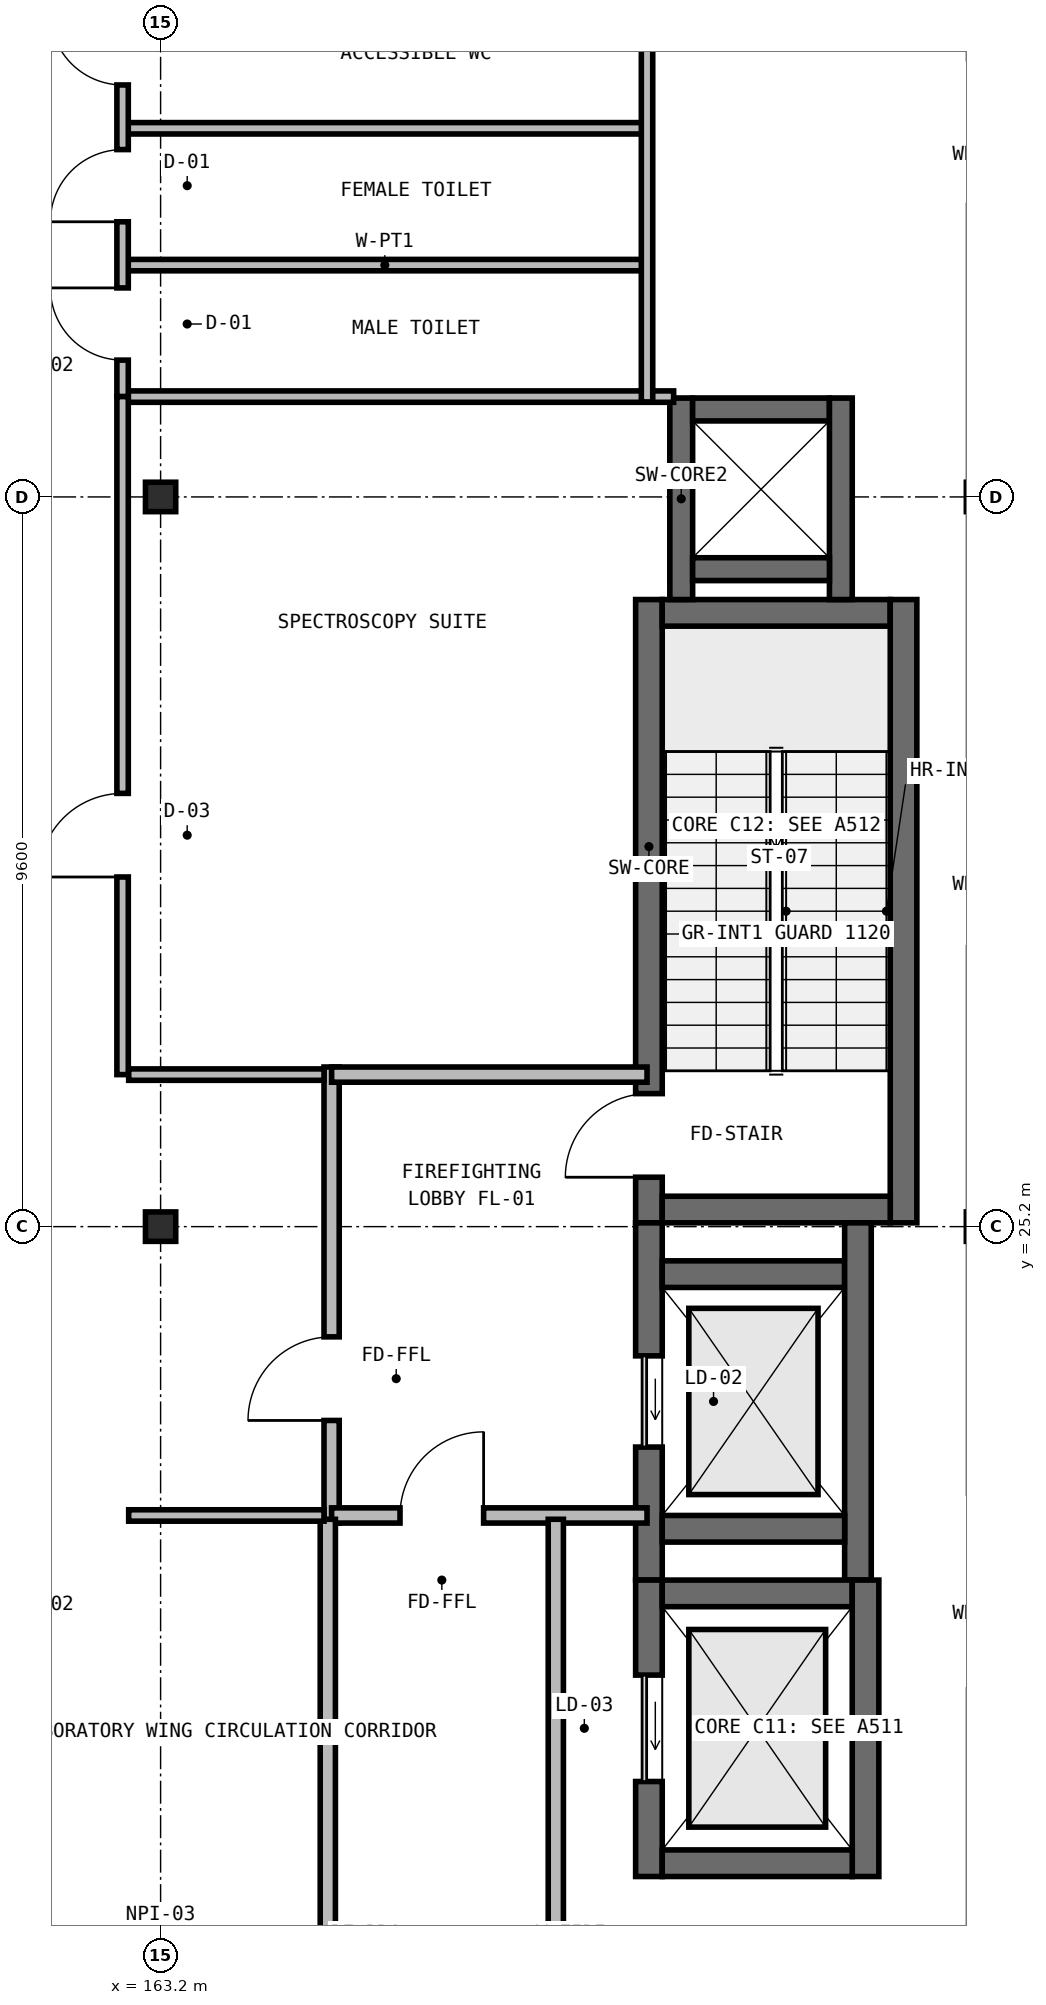
"""IFC4 building model, lengths in metres.
Left out: names, types, materials, properties, quantities, classifications, styles, units other than length and angle.
Written with IfcOpenShell. Run it as: python <this file> out.ifc"""

import sys

from ifc_helpers import new_model, si_unit, direction, frame, frame_2d, origin, origin_2d, place, context, subcontext, project, spatial, rectangle, i_section, extrude, element, fill, save


model = new_model("IFC4")
c1 = context("Model", 3, precision=1e-05, world=origin(), true_north=direction((0.0, 1.0)))
c2 = subcontext(c1, "Body", "Model", "MODEL_VIEW")
j1 = project(units=[si_unit("LENGTHUNIT", "METRE"), si_unit("PLANEANGLEUNIT", "RADIAN")], contexts=[c1])
p1 = place(None, origin())
s1 = spatial("IfcSite", under=j1, at=p1, CompositionType="ELEMENT")
p2 = place(p1, origin())
s2 = spatial("IfcBuilding", under=s1, at=p2, CompositionType="ELEMENT")
p3 = place(p2, origin())
s3 = spatial("IfcBuildingStorey", under=s2, at=p3, CompositionType="ELEMENT", Elevation=0.0)
p4 = place(p3, frame((169.625, 25.25, 0.0), z_axis=(0.0, 0.0, 1.0), x_axis=(0.0, 1.0, 0.0)))
e1 = element("IfcWall", 1, at=p4, inside=s3, PredefinedType="SHEAR", context=c2, shape_type="SweptSolid", body=[
    extrude(rectangle(XDim=8.2, YDim=0.35, at=frame_2d((4.1, 0.0))), origin(), (0.0, 0.0, 1.0), 5.25),
])
p5 = place(p4, frame((0.6, 0.0, 0.0)))
e2 = element("IfcOpeningElement", 2, at=p5, cuts=e1, PredefinedType="OPENING", context=c2, shape_type="SweptSolid", body=[
    extrude(rectangle(XDim=1.1, YDim=2.15, at=frame_2d((0.55, 1.075))), frame((0.0, 0.185, 0.0), z_axis=(0.0, -1.0, 0.0), x_axis=(1.0, 0.0, 0.0)), (0.0, 0.0, 1.0), 0.37),
])
p6 = place(p3, frame((169.8, 33.275, 0.0), z_axis=(0.0, 0.0, 1.0), x_axis=(1.0, 0.0, 0.0)))
e3 = element("IfcWall", 3, at=p6, inside=s3, PredefinedType="SHEAR", context=c2, shape_type="SweptSolid", body=[
    extrude(rectangle(XDim=3.0, YDim=0.35, at=frame_2d((1.5, 0.0))), origin(), (0.0, 0.0, 1.0), 5.25),
])
p7 = place(p3, frame((172.975, 33.45, 0.0), z_axis=(0.0, 0.0, 1.0), x_axis=(0.0, -1.0, 0.0)))
e4 = element("IfcWall", 4, at=p7, inside=s3, PredefinedType="SHEAR", context=c2, shape_type="SweptSolid", body=[
    extrude(rectangle(XDim=8.2, YDim=0.35, at=frame_2d((4.1, 0.0))), origin(), (0.0, 0.0, 1.0), 5.25),
])
p8 = place(p3, frame((172.8, 25.425, 0.0), z_axis=(0.0, 0.0, 1.0), x_axis=(-1.0, 0.0, 0.0)))
e5 = element("IfcWall", 5, at=p8, inside=s3, PredefinedType="SHEAR", context=c2, shape_type="SweptSolid", body=[
    extrude(rectangle(XDim=3.0, YDim=0.35, at=frame_2d((1.5, 0.0))), origin(), (0.0, 0.0, 1.0), 5.25),
])
p9 = place(p3, frame((169.625, 20.55, 0.0), z_axis=(0.0, 0.0, 1.0), x_axis=(0.0, 1.0, 0.0)))
e6 = element("IfcWall", 6, at=p9, inside=s3, PredefinedType="SHEAR", context=c2, shape_type="SweptSolid", body=[
    extrude(rectangle(XDim=4.7, YDim=0.35, at=frame_2d((2.35, 0.0))), origin(), (0.0, 0.0, 1.0), 5.25),
])
p10 = place(p9, frame((1.75, 0.0, 0.0)))
e7 = element("IfcOpeningElement", 7, at=p10, cuts=e6, PredefinedType="OPENING", context=c2, shape_type="SweptSolid", body=[
    extrude(rectangle(XDim=1.2, YDim=2.15, at=frame_2d((0.6, 1.075))), frame((0.0, 0.185, 0.0), z_axis=(0.0, -1.0, 0.0), x_axis=(1.0, 0.0, 0.0)), (0.0, 0.0, 1.0), 0.37),
])
p11 = place(p3, frame((169.8, 24.575, 0.0), z_axis=(0.0, 0.0, 1.0), x_axis=(1.0, 0.0, 0.0)))
e8 = element("IfcWall", 8, at=p11, inside=s3, PredefinedType="SHEAR", context=c2, shape_type="SweptSolid", body=[
    extrude(rectangle(XDim=2.4, YDim=0.35, at=frame_2d((1.2, 0.0))), origin(), (0.0, 0.0, 1.0), 5.25),
])
p12 = place(p3, frame((172.375, 25.25, 0.0), z_axis=(0.0, 0.0, 1.0), x_axis=(0.0, -1.0, 0.0)))
e9 = element("IfcWall", 9, at=p12, inside=s3, PredefinedType="SHEAR", context=c2, shape_type="SweptSolid", body=[
    extrude(rectangle(XDim=4.7, YDim=0.35, at=frame_2d((2.35, 0.0))), origin(), (0.0, 0.0, 1.0), 5.25),
])
p13 = place(p3, frame((172.2, 21.225, 0.0), z_axis=(0.0, 0.0, 1.0), x_axis=(-1.0, 0.0, 0.0)))
e10 = element("IfcWall", 10, at=p13, inside=s3, PredefinedType="SHEAR", context=c2, shape_type="SweptSolid", body=[
    extrude(rectangle(XDim=2.4, YDim=0.35, at=frame_2d((1.2, 0.0))), origin(), (0.0, 0.0, 1.0), 5.25),
])
p14 = place(p3, frame((169.625, 16.65, 0.0), z_axis=(0.0, 0.0, 1.0), x_axis=(0.0, 1.0, 0.0)))
e11 = element("IfcWall", 11, at=p14, inside=s3, PredefinedType="SHEAR", context=c2, shape_type="SweptSolid", body=[
    extrude(rectangle(XDim=3.9, YDim=0.35, at=frame_2d((1.95, 0.0))), origin(), (0.0, 0.0, 1.0), 5.25),
])
p15 = place(p14, frame((1.25, 0.0, 0.0)))
e12 = element("IfcOpeningElement", 12, at=p15, cuts=e11, PredefinedType="OPENING", context=c2, shape_type="SweptSolid", body=[
    extrude(rectangle(XDim=1.4, YDim=2.3, at=frame_2d((0.7, 1.15))), frame((0.0, 0.185, 0.0), z_axis=(0.0, -1.0, 0.0), x_axis=(1.0, 0.0, 0.0)), (0.0, 0.0, 1.0), 0.37),
])
p16 = place(p3, frame((169.8, 20.375, 0.0), z_axis=(0.0, 0.0, 1.0), x_axis=(1.0, 0.0, 0.0)))
e13 = element("IfcWall", 13, at=p16, inside=s3, PredefinedType="SHEAR", context=c2, shape_type="SweptSolid", body=[
    extrude(rectangle(XDim=2.5, YDim=0.35, at=frame_2d((1.25, 0.0))), origin(), (0.0, 0.0, 1.0), 5.25),
])
p17 = place(p3, frame((172.475, 20.55, 0.0), z_axis=(0.0, 0.0, 1.0), x_axis=(0.0, -1.0, 0.0)))
e14 = element("IfcWall", 14, at=p17, inside=s3, PredefinedType="SHEAR", context=c2, shape_type="SweptSolid", body=[
    extrude(rectangle(XDim=3.9, YDim=0.35, at=frame_2d((1.95, 0.0))), origin(), (0.0, 0.0, 1.0), 5.25),
])
p18 = place(p3, frame((172.3, 16.825, 0.0), z_axis=(0.0, 0.0, 1.0), x_axis=(-1.0, 0.0, 0.0)))
e15 = element("IfcWall", 15, at=p18, inside=s3, PredefinedType="SHEAR", context=c2, shape_type="SweptSolid", body=[
    extrude(rectangle(XDim=2.5, YDim=0.35, at=frame_2d((1.25, 0.0))), origin(), (0.0, 0.0, 1.0), 5.25),
])
for number, where, z_axis, x_axis in (
    (16, (163.2, 25.2, 0.0), (0.0, 0.0, 1.0), (1.0, 0.0, 0.0)),
    (17, (163.2, 34.8, 0.0), (0.0, 0.0, 1.0), (1.0, 0.0, 0.0)),
):
    element("IfcColumn", number, at=place(p3, frame(where, z_axis=z_axis, x_axis=x_axis)), inside=s3, PredefinedType="COLUMN", context=c2, shape_type="SweptSolid", body=[
        extrude(i_section(OverallWidth=0.398, OverallDepth=0.387, WebThickness=0.024, FlangeThickness=0.039, at=origin_2d()), origin(), (0.0, 0.0, 1.0), 5.25),
    ])
p19 = place(p3, frame((170.05, 33.45, 0.0), z_axis=(0.0, 0.0, 1.0), x_axis=(0.0, 1.0, 0.0)))
e18 = element("IfcWall", 18, at=p19, inside=s3, PredefinedType="SHEAR", context=c2, shape_type="SweptSolid", body=[
    extrude(rectangle(XDim=2.65, YDim=0.3, at=frame_2d((1.325, 0.0))), origin(), (0.0, 0.0, 1.0), 5.07),
])
p20 = place(p3, frame((170.2, 35.95, 0.0), z_axis=(0.0, 0.0, 1.0), x_axis=(1.0, 0.0, 0.0)))
e19 = element("IfcWall", 19, at=p20, inside=s3, PredefinedType="SHEAR", context=c2, shape_type="SweptSolid", body=[
    extrude(rectangle(XDim=1.8, YDim=0.3, at=frame_2d((0.9, 0.0))), origin(), (0.0, 0.0, 1.0), 5.07),
])
p21 = place(p3, frame((172.15, 36.1, 0.0), z_axis=(0.0, 0.0, 1.0), x_axis=(0.0, -1.0, 0.0)))
e20 = element("IfcWall", 20, at=p21, inside=s3, PredefinedType="SHEAR", context=c2, shape_type="SweptSolid", body=[
    extrude(rectangle(XDim=2.65, YDim=0.3, at=frame_2d((1.325, 0.0))), origin(), (0.0, 0.0, 1.0), 5.07),
])
p22 = place(p3, frame((172.0, 33.85, 0.0), z_axis=(0.0, 0.0, 1.0), x_axis=(-1.0, 0.0, 0.0)))
e21 = element("IfcWall", 21, at=p22, inside=s3, PredefinedType="SHEAR", context=c2, shape_type="SweptSolid", body=[
    extrude(rectangle(XDim=1.8, YDim=0.3, at=frame_2d((0.9, 0.0))), origin(), (0.0, 0.0, 1.0), 5.07),
])
p23 = place(p3, frame((165.45, 21.3, 0.0), z_axis=(0.0, 0.0, 1.0), x_axis=(0.0, 1.0, 0.0)))
e22 = element("IfcWall", 22, at=p23, inside=s3, PredefinedType="SOLIDWALL", context=c2, shape_type="SweptSolid", body=[
    extrude(rectangle(XDim=6.0, YDim=0.2, at=frame_2d((3.0, 0.0))), origin(), (0.0, 0.0, 1.0), 4.93),
])
p24 = place(p23, frame((1.35, 0.0, 0.0)))
e23 = element("IfcOpeningElement", 23, at=p24, cuts=e22, PredefinedType="OPENING", context=c2, shape_type="SweptSolid", body=[
    extrude(rectangle(XDim=1.1, YDim=2.15, at=frame_2d((0.55, 1.075))), frame((0.0, 0.11, 0.0), z_axis=(0.0, -1.0, 0.0), x_axis=(1.0, 0.0, 0.0)), (0.0, 0.0, 1.0), 0.22),
])
p25 = place(p3, frame((165.45, 21.4, 0.0), z_axis=(0.0, 0.0, 1.0), x_axis=(1.0, 0.0, 0.0)))
e24 = element("IfcWall", 24, at=p25, inside=s3, PredefinedType="SOLIDWALL", context=c2, shape_type="SweptSolid", body=[
    extrude(rectangle(XDim=4.15, YDim=0.2, at=frame_2d((2.075, 0.0))), origin(), (0.0, 0.0, 1.0), 4.93),
])
p26 = place(p25, frame((0.9, 0.0, 0.0)))
e25 = element("IfcOpeningElement", 25, at=p26, cuts=e24, PredefinedType="OPENING", context=c2, shape_type="SweptSolid", body=[
    extrude(rectangle(XDim=1.1, YDim=2.15, at=frame_2d((0.55, 1.075))), frame((0.0, 0.11, 0.0), z_axis=(0.0, -1.0, 0.0), x_axis=(1.0, 0.0, 0.0)), (0.0, 0.0, 1.0), 0.22),
])
p27 = place(p3, frame((165.45, 27.2, 0.0), z_axis=(0.0, 0.0, 1.0), x_axis=(1.0, 0.0, 0.0)))
e26 = element("IfcWall", 26, at=p27, inside=s3, PredefinedType="SOLIDWALL", context=c2, shape_type="SweptSolid", body=[
    extrude(rectangle(XDim=4.15, YDim=0.2, at=frame_2d((2.075, 0.0))), origin(), (0.0, 0.0, 1.0), 4.93),
])
p28 = place(p3, frame((165.4, 11.15, 0.0), z_axis=(0.0, 0.0, 1.0), x_axis=(0.0, 1.0, 0.0)))
e27 = element("IfcWall", 27, at=p28, inside=s3, PredefinedType="SOLIDWALL", context=c2, shape_type="SweptSolid", body=[
    extrude(rectangle(XDim=10.2, YDim=0.2, at=frame_2d((5.1, 0.0))), origin(), (0.0, 0.0, 1.0), 4.93),
])
p29 = place(p3, frame((168.4, 14.95, 0.0), z_axis=(0.0, 0.0, 1.0), x_axis=(0.0, 1.0, 0.0)))
e28 = element("IfcWall", 28, at=p29, inside=s3, PredefinedType="SOLIDWALL", context=c2, shape_type="SweptSolid", body=[
    extrude(rectangle(XDim=6.4, YDim=0.2, at=frame_2d((3.2, 0.0))), origin(), (0.0, 0.0, 1.0), 4.93),
])
for number, where, z_axis, x_axis in (
    (29, (162.7, 37.85, 0.0), (0.0, 0.0, 1.0), (1.0, 0.0, 0.0)),
    (30, (162.7, 39.65, 0.0), (0.0, 0.0, 1.0), (1.0, 0.0, 0.0)),
):
    element("IfcWall", number, at=place(p3, frame(where, z_axis=z_axis, x_axis=x_axis)), inside=s3, PredefinedType="PARTITIONING", context=c2, shape_type="SweptSolid", body=[
        extrude(rectangle(XDim=6.9, YDim=0.15, at=frame_2d((3.45, 0.0))), origin(), (0.0, 0.0, 1.0), 4.93),
    ])
p30 = place(p3, frame((162.7, 36.12, 0.0), z_axis=(0.0, 0.0, 1.0), x_axis=(1.0, 0.0, 0.0)))
e31 = element("IfcWall", 31, at=p30, inside=s3, PredefinedType="PARTITIONING", context=c2, shape_type="SweptSolid", body=[
    extrude(rectangle(XDim=7.25, YDim=0.15, at=frame_2d((3.625, 0.0))), origin(), (0.0, 0.0, 1.0), 4.93),
])
p31 = place(p3, frame((169.6, 36.05, 0.0), z_axis=(0.0, 0.0, 1.0), x_axis=(0.0, 1.0, 0.0)))
e32 = element("IfcWall", 32, at=p31, inside=s3, PredefinedType="PARTITIONING", context=c2, shape_type="SweptSolid", body=[
    extrude(rectangle(XDim=5.5, YDim=0.15, at=frame_2d((2.75, 0.0))), origin(), (0.0, 0.0, 1.0), 4.93),
])
p32 = place(p3, frame((162.7, 36.12, 0.0), z_axis=(0.0, 0.0, 1.0), x_axis=(0.0, 1.0, 0.0)))
e33 = element("IfcWall", 33, at=p32, inside=s3, PredefinedType="PARTITIONING", context=c2, shape_type="SweptSolid", body=[
    extrude(rectangle(XDim=5.4, YDim=0.15, at=frame_2d((2.7, 0.0))), origin(), (0.0, 0.0, 1.0), 4.93),
])
p33 = place(p32, frame((0.48, 0.0, 0.0)))
e34 = element("IfcOpeningElement", 34, at=p33, cuts=e33, PredefinedType="OPENING", context=c2, shape_type="SweptSolid", body=[
    extrude(rectangle(XDim=0.95, YDim=2.1, at=frame_2d((0.475, 1.05))), frame((0.0, 0.085, 0.0), z_axis=(0.0, -1.0, 0.0), x_axis=(1.0, 0.0, 0.0)), (0.0, 0.0, 1.0), 0.17),
])
p34 = place(p32, frame((2.3, 0.0, 0.0)))
e35 = element("IfcOpeningElement", 35, at=p34, cuts=e33, PredefinedType="OPENING", context=c2, shape_type="SweptSolid", body=[
    extrude(rectangle(XDim=0.95, YDim=2.1, at=frame_2d((0.475, 1.05))), frame((0.0, 0.085, 0.0), z_axis=(0.0, -1.0, 0.0), x_axis=(1.0, 0.0, 0.0)), (0.0, 0.0, 1.0), 0.17),
])
p35 = place(p32, frame((4.1, 0.0, 0.0)))
e36 = element("IfcOpeningElement", 36, at=p35, cuts=e33, PredefinedType="OPENING", context=c2, shape_type="SweptSolid", body=[
    extrude(rectangle(XDim=0.95, YDim=2.1, at=frame_2d((0.475, 1.05))), frame((0.0, 0.085, 0.0), z_axis=(0.0, -1.0, 0.0), x_axis=(1.0, 0.0, 0.0)), (0.0, 0.0, 1.0), 0.17),
])
p36 = place(p3, frame((162.78, 27.2, 0.0), z_axis=(0.0, 0.0, 1.0), x_axis=(1.0, 0.0, 0.0)))
e37 = element("IfcWall", 37, at=p36, inside=s3, PredefinedType="PARTITIONING", context=c2, shape_type="SweptSolid", body=[
    extrude(rectangle(XDim=2.57, YDim=0.15, at=frame_2d((1.285, 0.0))), origin(), (0.0, 0.0, 1.0), 4.93),
])
p37 = place(p3, frame((162.7, 27.2, 0.0), z_axis=(0.0, 0.0, 1.0), x_axis=(0.0, 1.0, 0.0)))
e38 = element("IfcWall", 38, at=p37, inside=s3, PredefinedType="PARTITIONING", context=c2, shape_type="SweptSolid", body=[
    extrude(rectangle(XDim=8.92, YDim=0.15, at=frame_2d((4.46, 0.0))), origin(), (0.0, 0.0, 1.0), 4.93),
])
p38 = place(p37, frame((2.6, 0.0, 0.0)))
e39 = element("IfcOpeningElement", 39, at=p38, cuts=e38, PredefinedType="OPENING", context=c2, shape_type="SweptSolid", body=[
    extrude(rectangle(XDim=1.1, YDim=2.2, at=frame_2d((0.55, 1.1))), frame((0.0, 0.085, 0.0), z_axis=(0.0, -1.0, 0.0), x_axis=(1.0, 0.0, 0.0)), (0.0, 0.0, 1.0), 0.17),
])
p39 = place(p3, frame((162.78, 21.4, 0.0), z_axis=(0.0, 0.0, 1.0), x_axis=(1.0, 0.0, 0.0)))
e40 = element("IfcWall", 40, at=p39, inside=s3, PredefinedType="PARTITIONING", context=c2, shape_type="SweptSolid", body=[
    extrude(rectangle(XDim=2.57, YDim=0.15, at=frame_2d((1.285, 0.0))), origin(), (0.0, 0.0, 1.0), 4.93),
])
p40 = place(p5, origin())
e41 = element("IfcDoor", 41, at=p40, inside=s3, OperationType="SINGLE_SWING_LEFT", PredefinedType="DOOR", context=c2, shape_type="SweptSolid", body=[
    extrude(rectangle(XDim=1.1, YDim=2.15, at=frame_2d((0.55, 1.075))), frame((0.0, 0.025, 0.0), z_axis=(0.0, -1.0, 0.0), x_axis=(1.0, 0.0, 0.0)), (0.0, 0.0, 1.0), 0.05),
])
fill(e2, e41)
p41 = place(p10, origin())
e42 = element("IfcDoor", 42, at=p41, inside=s3, OperationType="SLIDING_TO_LEFT", PredefinedType="USERDEFINED", context=c2, shape_type="SweptSolid", body=[
    extrude(rectangle(XDim=1.2, YDim=2.15, at=frame_2d((0.6, 1.075))), frame((0.0, 0.025, 0.0), z_axis=(0.0, -1.0, 0.0), x_axis=(1.0, 0.0, 0.0)), (0.0, 0.0, 1.0), 0.05),
])
fill(e7, e42)
p42 = place(p15, origin())
e43 = element("IfcDoor", 43, at=p42, inside=s3, OperationType="SLIDING_TO_LEFT", PredefinedType="USERDEFINED", context=c2, shape_type="SweptSolid", body=[
    extrude(rectangle(XDim=1.4, YDim=2.3, at=frame_2d((0.7, 1.15))), frame((0.0, 0.025, 0.0), z_axis=(0.0, -1.0, 0.0), x_axis=(1.0, 0.0, 0.0)), (0.0, 0.0, 1.0), 0.05),
])
fill(e12, e43)
p43 = place(p24, origin())
e44 = element("IfcDoor", 44, at=p43, inside=s3, OperationType="SINGLE_SWING_LEFT", PredefinedType="DOOR", context=c2, shape_type="SweptSolid", body=[
    extrude(rectangle(XDim=1.1, YDim=2.15, at=frame_2d((0.55, 1.075))), frame((0.0, 0.025, 0.0), z_axis=(0.0, -1.0, 0.0), x_axis=(1.0, 0.0, 0.0)), (0.0, 0.0, 1.0), 0.05),
])
fill(e23, e44)
p44 = place(p26, origin())
e45 = element("IfcDoor", 45, at=p44, inside=s3, OperationType="SINGLE_SWING_RIGHT", PredefinedType="DOOR", context=c2, shape_type="SweptSolid", body=[
    extrude(rectangle(XDim=1.1, YDim=2.15, at=frame_2d((0.55, 1.075))), frame((0.0, 0.025, 0.0), z_axis=(0.0, -1.0, 0.0), x_axis=(1.0, 0.0, 0.0)), (0.0, 0.0, 1.0), 0.05),
])
fill(e25, e45)
p45 = place(p33, origin())
e46 = element("IfcDoor", 46, at=p45, inside=s3, OperationType="SINGLE_SWING_RIGHT", PredefinedType="DOOR", context=c2, shape_type="SweptSolid", body=[
    extrude(rectangle(XDim=0.95, YDim=2.1, at=frame_2d((0.475, 1.05))), frame((0.0, 0.025, 0.0), z_axis=(0.0, -1.0, 0.0), x_axis=(1.0, 0.0, 0.0)), (0.0, 0.0, 1.0), 0.05),
])
fill(e34, e46)
p46 = place(p34, origin())
e47 = element("IfcDoor", 47, at=p46, inside=s3, OperationType="SINGLE_SWING_LEFT", PredefinedType="DOOR", context=c2, shape_type="SweptSolid", body=[
    extrude(rectangle(XDim=0.95, YDim=2.1, at=frame_2d((0.475, 1.05))), frame((0.0, 0.025, 0.0), z_axis=(0.0, -1.0, 0.0), x_axis=(1.0, 0.0, 0.0)), (0.0, 0.0, 1.0), 0.05),
])
fill(e35, e47)
p47 = place(p35, origin())
e48 = element("IfcDoor", 48, at=p47, inside=s3, OperationType="SINGLE_SWING_RIGHT", PredefinedType="DOOR", context=c2, shape_type="SweptSolid", body=[
    extrude(rectangle(XDim=0.95, YDim=2.1, at=frame_2d((0.475, 1.05))), frame((0.0, 0.025, 0.0), z_axis=(0.0, -1.0, 0.0), x_axis=(1.0, 0.0, 0.0)), (0.0, 0.0, 1.0), 0.05),
])
fill(e36, e48)
p48 = place(p38, origin())
e49 = element("IfcDoor", 49, at=p48, inside=s3, OperationType="SINGLE_SWING_LEFT", PredefinedType="DOOR", context=c2, shape_type="SweptSolid", body=[
    extrude(rectangle(XDim=1.1, YDim=2.2, at=frame_2d((0.55, 1.1))), frame((0.0, 0.025, 0.0), z_axis=(0.0, -1.0, 0.0), x_axis=(1.0, 0.0, 0.0)), (0.0, 0.0, 1.0), 0.05),
])
fill(e39, e49)
save(model, sys.argv[1])
